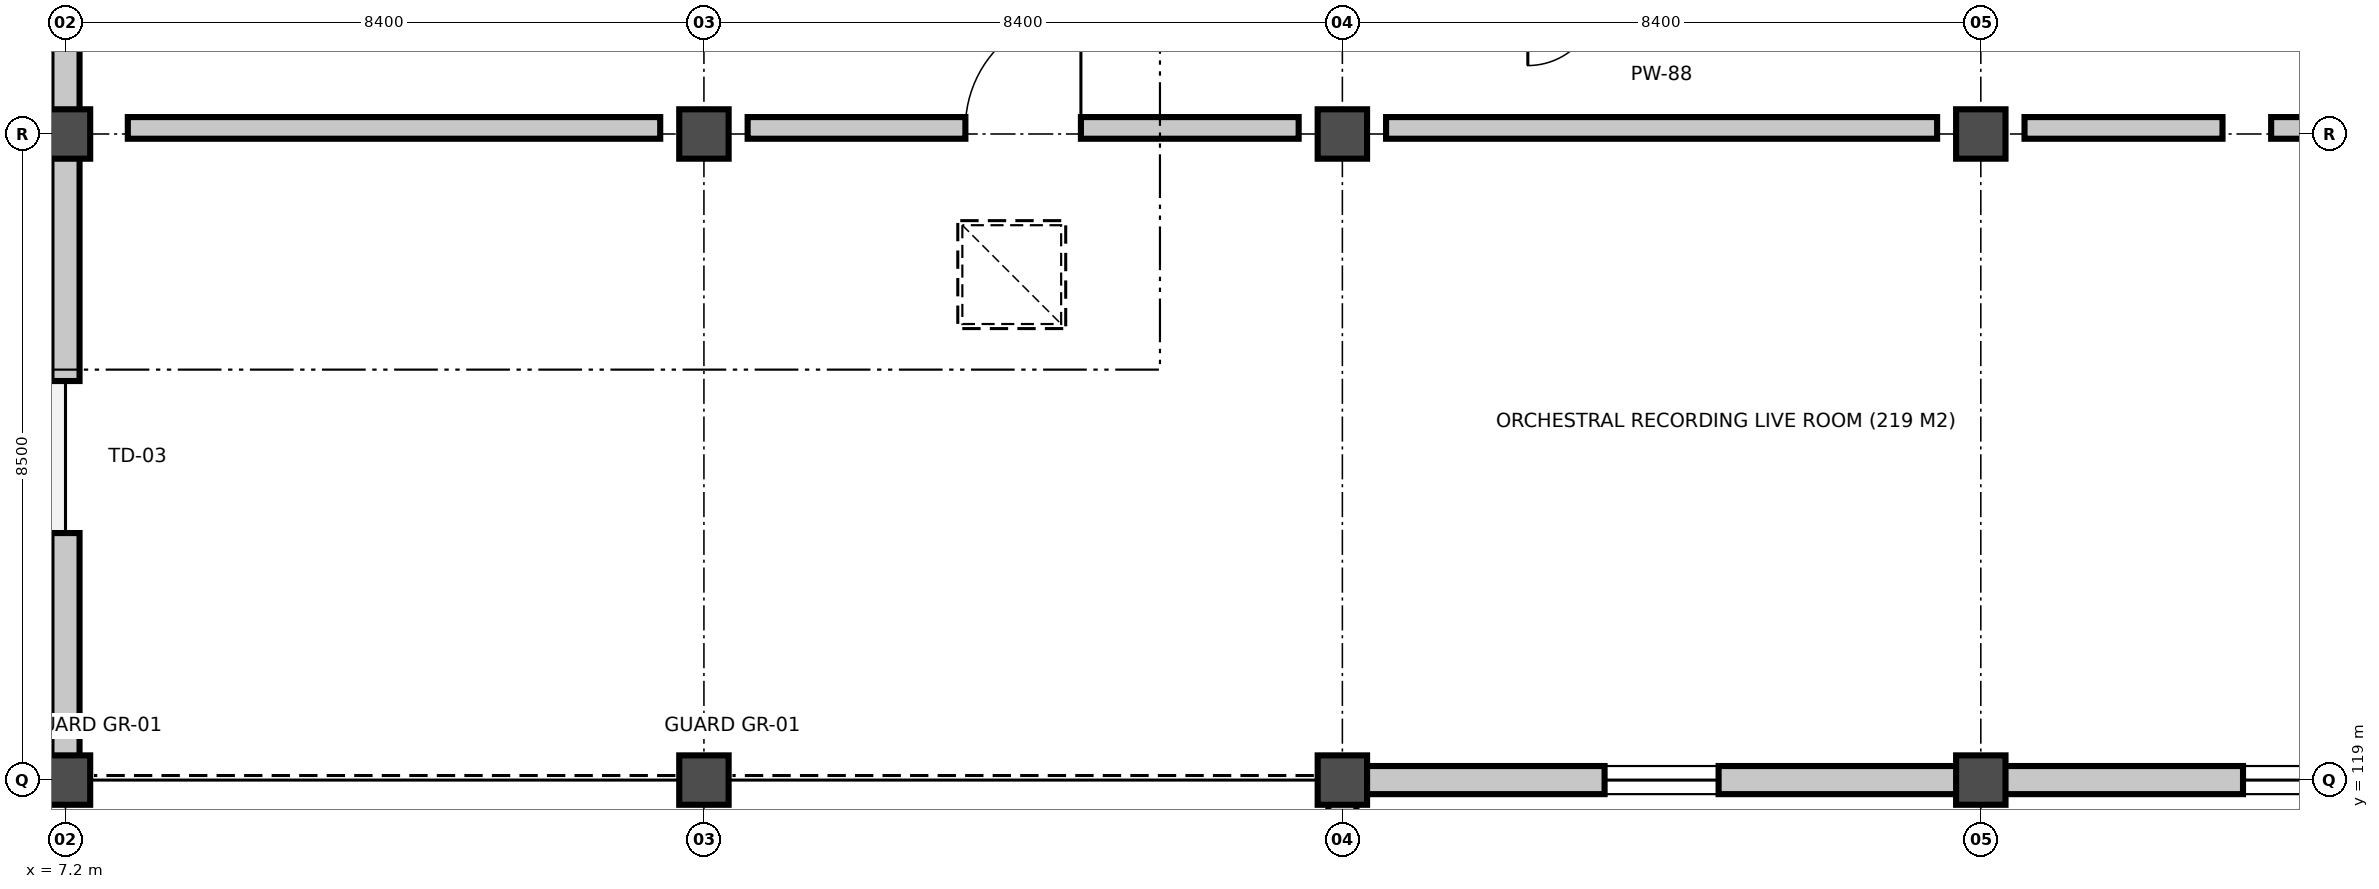
"""IFC4 building model, lengths in metres.
Left out: names, types, materials, properties, quantities, classifications, styles, units other than length and angle.
Written with IfcOpenShell. Run it as: python <this file> out.ifc"""

import sys

from ifc_helpers import new_model, si_unit, direction, frame, frame_2d, origin, origin_2d, place, context, subcontext, project, spatial, rectangle, extrude, element, fill, save


model = new_model("IFC4")
c1 = context("Model", 3, precision=1e-05, world=origin(), true_north=direction((0.0, 1.0)))
c2 = subcontext(c1, "Body", "Model", "MODEL_VIEW")
j1 = project(units=[si_unit("LENGTHUNIT", "METRE"), si_unit("PLANEANGLEUNIT", "RADIAN")], contexts=[c1])
p1 = place(None, origin())
s1 = spatial("IfcSite", under=j1, at=p1, CompositionType="ELEMENT")
p2 = place(p1, origin())
s2 = spatial("IfcBuilding", under=s1, at=p2, CompositionType="ELEMENT")
p3 = place(p2, frame((0.0, 0.0, 15.0)))
s3 = spatial("IfcBuildingStorey", under=s2, at=p3, CompositionType="ELEMENT", Elevation=15.0)
for number, where, z_axis, x_axis in (
    (1, (7.2, 119.0, 0.0), (0.0, 0.0, 1.0), (1.0, 0.0, 0.0)),
    (2, (7.2, 127.5, 0.0), (0.0, 0.0, 1.0), (1.0, 0.0, 0.0)),
    (3, (15.6, 119.0, 0.0), (0.0, 0.0, 1.0), (1.0, 0.0, 0.0)),
    (4, (15.6, 127.5, 0.0), (0.0, 0.0, 1.0), (1.0, 0.0, 0.0)),
    (5, (24.0, 119.0, 0.0), (0.0, 0.0, 1.0), (1.0, 0.0, 0.0)),
    (6, (24.0, 127.5, 0.0), (0.0, 0.0, 1.0), (1.0, 0.0, 0.0)),
    (7, (32.4, 119.0, 0.0), (0.0, 0.0, 1.0), (1.0, 0.0, 0.0)),
    (8, (32.4, 127.5, 0.0), (0.0, 0.0, 1.0), (1.0, 0.0, 0.0)),
):
    element("IfcColumn", number, at=place(p3, frame(where, z_axis=z_axis, x_axis=x_axis)), inside=s3, PredefinedType="COLUMN", context=c2, shape_type="SweptSolid", body=[
        extrude(rectangle(XDim=0.65, YDim=0.65, at=origin_2d()), origin(), (0.0, 0.0, 1.0), 4.5),
    ])
p4 = place(p3, frame((7.2, 119.305, 0.0), z_axis=(0.0, 0.0, 1.0), x_axis=(0.0, 1.0, 0.0)))
e9 = element("IfcWall", 9, at=p4, inside=s3, PredefinedType="SOLIDWALL", context=c2, shape_type="SweptSolid", body=[
    extrude(rectangle(XDim=7.89, YDim=0.37, at=frame_2d((3.945, 0.0))), origin(), (0.0, 0.0, 1.0), 3.536),
])
p5 = place(p4, frame((2.945, 0.0, 0.0)))
e10 = element("IfcOpeningElement", 10, at=p5, cuts=e9, PredefinedType="OPENING", context=c2, shape_type="SweptSolid", body=[
    extrude(rectangle(XDim=2.0, YDim=2.42, at=frame_2d((1.0, 1.21))), frame((0.0, 0.195, 0.0), z_axis=(0.0, -1.0, 0.0), x_axis=(1.0, 0.0, 0.0)), (0.0, 0.0, 1.0), 0.39),
])
p6 = place(p3, frame((7.2, 127.805, 0.0), z_axis=(0.0, 0.0, 1.0), x_axis=(0.0, 1.0, 0.0)))
e11 = element("IfcWall", 11, at=p6, inside=s3, PredefinedType="SOLIDWALL", context=c2, shape_type="SweptSolid", body=[
    extrude(rectangle(XDim=7.89, YDim=0.37, at=frame_2d((3.945, 0.0))), origin(), (0.0, 0.0, 1.0), 3.595),
])
p7 = place(p6, frame((3.195, 0.0, 1.0)))
e12 = element("IfcOpeningElement", 12, at=p7, cuts=e11, PredefinedType="OPENING", context=c2, shape_type="SweptSolid", body=[
    extrude(rectangle(XDim=1.5, YDim=1.95, at=frame_2d((0.75, 0.975))), frame((0.0, 0.195, 0.0), z_axis=(0.0, -1.0, 0.0), x_axis=(1.0, 0.0, 0.0)), (0.0, 0.0, 1.0), 0.39),
])
p8 = place(p3, frame((32.095, 119.0, 0.0), z_axis=(0.0, 0.0, 1.0), x_axis=(-1.0, 0.0, 0.0)))
e13 = element("IfcWall", 13, at=p8, inside=s3, PredefinedType="SOLIDWALL", context=c2, shape_type="SweptSolid", body=[
    extrude(rectangle(XDim=7.79, YDim=0.37, at=frame_2d((3.895, 0.0))), origin(), (0.0, 0.0, 1.0), 3.244),
])
p9 = place(p8, frame((3.145, 0.0, 1.0)))
e14 = element("IfcOpeningElement", 14, at=p9, cuts=e13, PredefinedType="OPENING", context=c2, shape_type="SweptSolid", body=[
    extrude(rectangle(XDim=1.5, YDim=1.95, at=frame_2d((0.75, 0.975))), frame((0.0, 0.195, 0.0), z_axis=(0.0, -1.0, 0.0), x_axis=(1.0, 0.0, 0.0)), (0.0, 0.0, 1.0), 0.39),
])
p10 = place(p3, frame((40.495, 119.0, 0.0), z_axis=(0.0, 0.0, 1.0), x_axis=(-1.0, 0.0, 0.0)))
e15 = element("IfcWall", 15, at=p10, inside=s3, PredefinedType="SOLIDWALL", context=c2, shape_type="SweptSolid", body=[
    extrude(rectangle(XDim=7.79, YDim=0.37, at=frame_2d((3.895, 0.0))), origin(), (0.0, 0.0, 1.0), 3.536),
])
p11 = place(p10, frame((3.145, 0.0, 1.0)))
e16 = element("IfcOpeningElement", 16, at=p11, cuts=e15, PredefinedType="OPENING", context=c2, shape_type="SweptSolid", body=[
    extrude(rectangle(XDim=1.5, YDim=1.95, at=frame_2d((0.75, 0.975))), frame((0.0, 0.195, 0.0), z_axis=(0.0, -1.0, 0.0), x_axis=(1.0, 0.0, 0.0)), (0.0, 0.0, 1.0), 0.39),
])
p12 = place(p3, frame((24.0, 118.695, -0.273), z_axis=(0.0, 0.0, 1.0), x_axis=(0.0, -1.0, 0.0)))
e17 = element("IfcWall", 17, at=p12, inside=s3, PredefinedType="SOLIDWALL", context=c2, shape_type="SweptSolid", body=[
    extrude(rectangle(XDim=7.89, YDim=0.37, at=frame_2d((3.945, 0.0))), origin(), (0.0, 0.0, 1.0), 3.868),
])
p13 = place(p12, frame((3.195, 0.0, 1.0)))
e18 = element("IfcOpeningElement", 18, at=p13, cuts=e17, PredefinedType="OPENING", context=c2, shape_type="SweptSolid", body=[
    extrude(rectangle(XDim=1.5, YDim=1.95, at=frame_2d((0.75, 0.975))), frame((0.0, 0.195, 0.0), z_axis=(0.0, -1.0, 0.0), x_axis=(1.0, 0.0, 0.0)), (0.0, 0.0, 1.0), 0.39),
])
p14 = place(p3, frame((8.02, 127.58, 0.0), z_axis=(0.0, 0.0, 1.0), x_axis=(1.0, 0.0, 0.0)))
e19 = element("IfcWall", 19, at=p14, inside=s3, PredefinedType="PARTITIONING", context=c2, shape_type="SweptSolid", body=[
    extrude(rectangle(XDim=7.005, YDim=0.285, at=frame_2d((3.502, 0.0))), origin(), (0.0, 0.0, 1.0), 3.118),
])
p15 = place(p3, frame((16.175, 127.58, 0.0), z_axis=(0.0, 0.0, 1.0), x_axis=(1.0, 0.0, 0.0)))
e20 = element("IfcWall", 20, at=p15, inside=s3, PredefinedType="PARTITIONING", context=c2, shape_type="SweptSolid", body=[
    extrude(rectangle(XDim=7.25, YDim=0.285, at=frame_2d((3.625, 0.0))), origin(), (0.0, 0.0, 1.0), 3.13),
])
p16 = place(p15, frame((2.865, 0.0, 0.0)))
e21 = element("IfcOpeningElement", 21, at=p16, cuts=e20, PredefinedType="OPENING", context=c2, shape_type="SweptSolid", body=[
    extrude(rectangle(XDim=1.52, YDim=2.38, at=frame_2d((0.76, 1.19))), frame((0.0, 0.152, 0.0), z_axis=(0.0, -1.0, 0.0), x_axis=(1.0, 0.0, 0.0)), (0.0, 0.0, 1.0), 0.305),
])
p17 = place(p3, frame((24.575, 127.58, 0.0), z_axis=(0.0, 0.0, 1.0), x_axis=(1.0, 0.0, 0.0)))
e22 = element("IfcWall", 22, at=p17, inside=s3, PredefinedType="PARTITIONING", context=c2, shape_type="SweptSolid", body=[
    extrude(rectangle(XDim=7.25, YDim=0.285, at=frame_2d((3.625, 0.0))), origin(), (0.0, 0.0, 1.0), 3.13),
])
p18 = place(p3, frame((32.975, 127.58, 0.0), z_axis=(0.0, 0.0, 1.0), x_axis=(1.0, 0.0, 0.0)))
e23 = element("IfcWall", 23, at=p18, inside=s3, PredefinedType="PARTITIONING", context=c2, shape_type="SweptSolid", body=[
    extrude(rectangle(XDim=2.605, YDim=0.285, at=frame_2d((1.302, 0.0))), origin(), (0.0, 0.0, 1.0), 3.13),
])
p19 = place(p3, frame((36.22, 127.58, 0.0), z_axis=(0.0, 0.0, 1.0), x_axis=(1.0, 0.0, 0.0)))
e24 = element("IfcWall", 24, at=p19, inside=s3, PredefinedType="PARTITIONING", context=c2, shape_type="SweptSolid", body=[
    extrude(rectangle(XDim=4.005, YDim=0.285, at=frame_2d((2.002, 0.0))), origin(), (0.0, 0.0, 1.0), 3.13),
])
p20 = place(p19, frame((1.242, 0.0, 0.0)))
e25 = element("IfcOpeningElement", 25, at=p20, cuts=e24, PredefinedType="OPENING", context=c2, shape_type="SweptSolid", body=[
    extrude(rectangle(XDim=1.52, YDim=2.38, at=frame_2d((0.76, 1.19))), frame((0.0, 0.152, 0.0), z_axis=(0.0, -1.0, 0.0), x_axis=(1.0, 0.0, 0.0)), (0.0, 0.0, 1.0), 0.305),
])
p21 = place(p5, origin())
e26 = element("IfcDoor", 26, at=p21, inside=s3, OperationType="SINGLE_SWING_RIGHT", PredefinedType="DOOR", context=c2, shape_type="SweptSolid", body=[
    extrude(rectangle(XDim=2.0, YDim=2.42, at=frame_2d((1.0, 1.21))), frame((0.0, 0.025, 0.0), z_axis=(0.0, -1.0, 0.0), x_axis=(1.0, 0.0, 0.0)), (0.0, 0.0, 1.0), 0.05),
])
fill(e10, e26)
p22 = place(p9, origin())
e27 = element("IfcWindow", 27, at=p22, inside=s3, PartitioningType="SINGLE_PANEL", PredefinedType="WINDOW", context=c2, shape_type="SweptSolid", body=[
    extrude(rectangle(XDim=1.5, YDim=1.95, at=frame_2d((0.75, 0.975))), frame((0.0, 0.03, 0.0), z_axis=(0.0, -1.0, 0.0), x_axis=(1.0, 0.0, 0.0)), (0.0, 0.0, 1.0), 0.06),
])
fill(e14, e27)
p23 = place(p11, origin())
e28 = element("IfcWindow", 28, at=p23, inside=s3, PartitioningType="SINGLE_PANEL", PredefinedType="WINDOW", context=c2, shape_type="SweptSolid", body=[
    extrude(rectangle(XDim=1.5, YDim=1.95, at=frame_2d((0.75, 0.975))), frame((0.0, 0.03, 0.0), z_axis=(0.0, -1.0, 0.0), x_axis=(1.0, 0.0, 0.0)), (0.0, 0.0, 1.0), 0.06),
])
fill(e16, e28)
p24 = place(p16, origin())
e29 = element("IfcDoor", 29, at=p24, inside=s3, OperationType="SINGLE_SWING_RIGHT", PredefinedType="DOOR", context=c2, shape_type="SweptSolid", body=[
    extrude(rectangle(XDim=1.52, YDim=2.38, at=frame_2d((0.76, 1.19))), frame((0.0, 0.025, 0.0), z_axis=(0.0, -1.0, 0.0), x_axis=(1.0, 0.0, 0.0)), (0.0, 0.0, 1.0), 0.05),
])
fill(e21, e29)
save(model, sys.argv[1])
